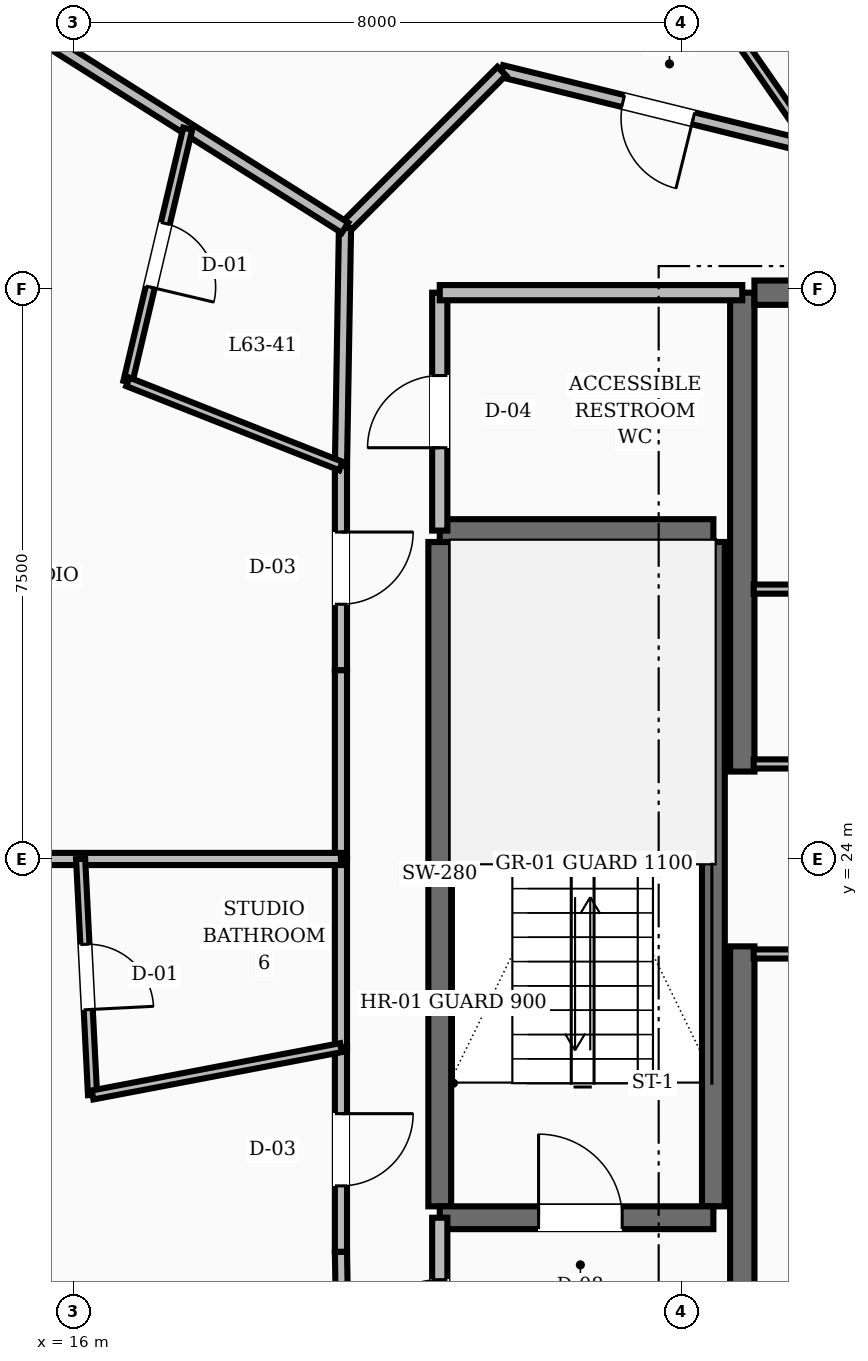
"""IFC4 building model, lengths in metres.
Left out: names, types, materials, properties, quantities, classifications, styles, units other than length and angle.
Written with IfcOpenShell. Run it as: python <this file> out.ifc"""

import sys

from ifc_helpers import new_model, si_unit, direction, frame, frame_2d, origin, place, context, subcontext, project, spatial, rectangle, extrude, element, fill, save


model = new_model("IFC4")
c1 = context("Model", 3, precision=1e-05, world=origin(), true_north=direction((0.0, 1.0)))
c2 = subcontext(c1, "Body", "Model", "MODEL_VIEW")
j1 = project(units=[si_unit("LENGTHUNIT", "METRE"), si_unit("PLANEANGLEUNIT", "RADIAN")], contexts=[c1])
p1 = place(None, origin())
s1 = spatial("IfcSite", under=j1, at=p1, CompositionType="ELEMENT")
p2 = place(p1, origin())
s2 = spatial("IfcBuilding", under=s1, at=p2, CompositionType="ELEMENT")
p3 = place(p2, frame((0.0, 0.0, 243.6)))
s3 = spatial("IfcBuildingStorey", under=s2, at=p3, CompositionType="ELEMENT", Elevation=243.6)
for number, where, z_axis, x_axis in (
    (1, (24.8, 16.55, 0.0), (0.0, 0.0, 1.0), (0.0, 1.0, 0.0)),
    (2, (24.8, 25.15, 0.0), (0.0, 0.0, 1.0), (0.0, 1.0, 0.0)),
):
    element("IfcWall", number, at=place(p3, frame(where, z_axis=z_axis, x_axis=x_axis)), inside=s3, PredefinedType="SHEAR", context=c2, shape_type="SweptSolid", body=[
        extrude(rectangle(XDim=6.3, YDim=0.32, at=frame_2d((3.15, 0.0))), origin(), (0.0, 0.0, 1.0), 3.6),
    ])
p4 = place(p3, frame((24.96, 31.45, 0.0), z_axis=(0.0, 0.0, 1.0), x_axis=(1.0, 0.0, 0.0)))
e3 = element("IfcWall", 3, at=p4, inside=s3, PredefinedType="SHEAR", context=c2, shape_type="SweptSolid", body=[
    extrude(rectangle(XDim=3.24, YDim=0.32, at=frame_2d((1.62, 0.0))), origin(), (0.0, 0.0, 1.0), 3.6),
])
for number, where, z_axis, x_axis in (
    (4, (20.82, 19.43, 0.0), (0.0, 0.0, 1.0), (0.0, 1.0, 0.0)),
    (5, (24.42, 19.43, 0.0), (0.0, 0.0, 1.0), (0.0, 1.0, 0.0)),
):
    element("IfcWall", number, at=place(p3, frame(where, z_axis=z_axis, x_axis=x_axis)), inside=s3, PredefinedType="SHEAR", context=c2, shape_type="SweptSolid", body=[
        extrude(rectangle(XDim=8.74, YDim=0.3, at=frame_2d((4.37, 0.0))), origin(), (0.0, 0.0, 1.0), 3.6),
    ])
p5 = place(p3, frame((20.82, 19.28, 0.0), z_axis=(0.0, 0.0, 1.0), x_axis=(1.0, 0.0, 0.0)))
e6 = element("IfcWall", 6, at=p5, inside=s3, PredefinedType="SHEAR", context=c2, shape_type="SweptSolid", body=[
    extrude(rectangle(XDim=3.6, YDim=0.3, at=frame_2d((1.8, 0.0))), origin(), (0.0, 0.0, 1.0), 3.6),
])
p6 = place(p5, frame((1.3, 0.0, 0.0)))
e7 = element("IfcOpeningElement", 7, at=p6, cuts=e6, PredefinedType="OPENING", context=c2, shape_type="SweptSolid", body=[
    extrude(rectangle(XDim=1.1, YDim=2.1, at=frame_2d((0.55, 1.05))), frame((0.0, 0.16, 0.0), z_axis=(0.0, -1.0, 0.0), x_axis=(1.0, 0.0, 0.0)), (0.0, 0.0, 1.0), 0.32),
])
p7 = place(p3, frame((20.82, 28.32, 0.0), z_axis=(0.0, 0.0, 1.0), x_axis=(1.0, 0.0, 0.0)))
e8 = element("IfcWall", 8, at=p7, inside=s3, PredefinedType="SHEAR", context=c2, shape_type="SweptSolid", body=[
    extrude(rectangle(XDim=3.6, YDim=0.3, at=frame_2d((1.8, 0.0))), origin(), (0.0, 0.0, 1.0), 3.6),
])
p8 = place(p3, frame((20.82, 16.55, 0.0), z_axis=(0.0, 0.0, 1.0), x_axis=(0.0, 1.0, 0.0)))
e9 = element("IfcWall", 9, at=p8, inside=s3, PredefinedType="SOLIDWALL", context=c2, shape_type="SweptSolid", body=[
    extrude(rectangle(XDim=2.73, YDim=0.2, at=frame_2d((1.365, 0.0))), origin(), (0.0, 0.0, 1.0), 2.87),
])
p9 = place(p8, frame((0.815, 0.0, 0.0)))
e10 = element("IfcOpeningElement", 10, at=p9, cuts=e9, PredefinedType="OPENING", context=c2, shape_type="SweptSolid", body=[
    extrude(rectangle(XDim=1.1, YDim=2.1, at=frame_2d((0.55, 1.05))), frame((0.0, 0.11, 0.0), z_axis=(0.0, -1.0, 0.0), x_axis=(1.0, 0.0, 0.0)), (0.0, 0.0, 1.0), 0.22),
])
p10 = place(p3, frame((20.82, 28.32, 0.0), z_axis=(0.0, 0.0, 1.0), x_axis=(0.0, 1.0, 0.0)))
e11 = element("IfcWall", 11, at=p10, inside=s3, PredefinedType="SOLIDWALL", context=c2, shape_type="SweptSolid", body=[
    extrude(rectangle(XDim=3.13, YDim=0.2, at=frame_2d((1.565, 0.0))), origin(), (0.0, 0.0, 1.0), 2.87),
])
p11 = place(p10, frame((1.09, 0.0, 0.0)))
e12 = element("IfcOpeningElement", 12, at=p11, cuts=e11, PredefinedType="OPENING", context=c2, shape_type="SweptSolid", body=[
    extrude(rectangle(XDim=0.95, YDim=2.1, at=frame_2d((0.475, 1.05))), frame((0.0, 0.11, 0.0), z_axis=(0.0, -1.0, 0.0), x_axis=(1.0, 0.0, 0.0)), (0.0, 0.0, 1.0), 0.22),
])
p12 = place(p3, frame((20.82, 31.45, 0.0), z_axis=(0.0, 0.0, 1.0), x_axis=(1.0, 0.0, 0.0)))
e13 = element("IfcWall", 13, at=p12, inside=s3, PredefinedType="SOLIDWALL", context=c2, shape_type="SweptSolid", body=[
    extrude(rectangle(XDim=3.98, YDim=0.2, at=frame_2d((1.99, 0.0))), origin(), (0.0, 0.0, 1.0), 2.87),
])
p13 = place(p3, frame((24.95, 25.25, 0.0), z_axis=(0.0, 0.0, 1.0), x_axis=(1.0, 0.0, 0.0)))
e14 = element("IfcWall", 14, at=p13, inside=s3, PredefinedType="PARTITIONING", context=c2, shape_type="SweptSolid", body=[
    extrude(rectangle(XDim=3.2, YDim=0.12, at=frame_2d((1.6, 0.0))), origin(), (0.0, 0.0, 1.0), 2.87),
])
p14 = place(p13, frame((1.125, 0.0, 0.0)))
e15 = element("IfcOpeningElement", 15, at=p14, cuts=e14, PredefinedType="OPENING", context=c2, shape_type="SweptSolid", body=[
    extrude(rectangle(XDim=0.95, YDim=2.1, at=frame_2d((0.475, 1.05))), frame((0.0, 0.07, 0.0), z_axis=(0.0, -1.0, 0.0), x_axis=(1.0, 0.0, 0.0)), (0.0, 0.0, 1.0), 0.14),
])
p15 = place(p3, frame((24.95, 22.75, 0.0), z_axis=(0.0, 0.0, 1.0), x_axis=(1.0, 0.0, 0.0)))
e16 = element("IfcWall", 16, at=p15, inside=s3, PredefinedType="PARTITIONING", context=c2, shape_type="SweptSolid", body=[
    extrude(rectangle(XDim=3.2, YDim=0.12, at=frame_2d((1.6, 0.0))), origin(), (0.0, 0.0, 1.0), 2.87),
])
p16 = place(p15, frame((1.125, 0.0, 0.0)))
e17 = element("IfcOpeningElement", 17, at=p16, cuts=e16, PredefinedType="OPENING", context=c2, shape_type="SweptSolid", body=[
    extrude(rectangle(XDim=0.95, YDim=2.1, at=frame_2d((0.475, 1.05))), frame((0.0, 0.07, 0.0), z_axis=(0.0, -1.0, 0.0), x_axis=(1.0, 0.0, 0.0)), (0.0, 0.0, 1.0), 0.14),
])
p17 = place(p3, frame((24.95, 27.55, 0.0), z_axis=(0.0, 0.0, 1.0), x_axis=(1.0, 0.0, 0.0)))
e18 = element("IfcWall", 18, at=p17, inside=s3, PredefinedType="PARTITIONING", context=c2, shape_type="SweptSolid", body=[
    extrude(rectangle(XDim=3.2, YDim=0.12, at=frame_2d((1.6, 0.0))), origin(), (0.0, 0.0, 1.0), 2.87),
])
p18 = place(p17, frame((1.125, 0.0, 0.0)))
e19 = element("IfcOpeningElement", 19, at=p18, cuts=e18, PredefinedType="OPENING", context=c2, shape_type="SweptSolid", body=[
    extrude(rectangle(XDim=0.95, YDim=2.1, at=frame_2d((0.475, 1.05))), frame((0.0, 0.07, 0.0), z_axis=(0.0, -1.0, 0.0), x_axis=(1.0, 0.0, 0.0)), (0.0, 0.0, 1.0), 0.14),
])
p19 = place(p3, frame((25.752, 33.35, 0.0), z_axis=(0.0, 0.0, 1.0), x_axis=(-0.970939799552, 0.239323850978, 0.0)))
e20 = element("IfcWall", 20, at=p19, inside=s3, PredefinedType="SOLIDWALL", context=c2, shape_type="SweptSolid", body=[
    extrude(rectangle(XDim=4.241, YDim=0.16, at=frame_2d((2.12, 0.0))), origin(), (0.0, 0.0, 1.0), 2.87),
])
p20 = place(p19, frame((1.646, 0.0, 0.0)))
e21 = element("IfcOpeningElement", 21, at=p20, cuts=e20, PredefinedType="OPENING", context=c2, shape_type="SweptSolid", body=[
    extrude(rectangle(XDim=0.95, YDim=2.1, at=frame_2d((0.475, 1.05))), frame((0.0, 0.09, 0.0), z_axis=(0.0, -1.0, 0.0), x_axis=(1.0, 0.0, 0.0)), (0.0, 0.0, 1.0), 0.18),
])
p21 = place(p3, frame((21.635, 34.365, 0.0), z_axis=(0.0, 0.0, 1.0), x_axis=(-0.707106781187, -0.707106781187, 0.0)))
e22 = element("IfcWall", 22, at=p21, inside=s3, PredefinedType="SOLIDWALL", context=c2, shape_type="SweptSolid", body=[
    extrude(rectangle(XDim=2.916, YDim=0.16, at=frame_2d((1.458, 0.0))), origin(), (0.0, 0.0, 1.0), 2.87),
])
p22 = place(p3, frame((19.573, 32.303, 0.0), z_axis=(0.0, 0.0, 1.0), x_axis=(-0.016981035134, -0.999855811828, 0.0)))
e23 = element("IfcWall", 23, at=p22, inside=s3, PredefinedType="SOLIDWALL", context=c2, shape_type="SweptSolid", body=[
    extrude(rectangle(XDim=3.134, YDim=0.16, at=frame_2d((1.567, 0.0))), origin(), (0.0, 0.0, 1.0), 2.87),
])
p23 = place(p3, frame((19.52, 29.169, 0.0), z_axis=(0.0, 0.0, 1.0), x_axis=(0.0, -1.0, 0.0)))
e24 = element("IfcWall", 24, at=p23, inside=s3, PredefinedType="SOLIDWALL", context=c2, shape_type="SweptSolid", body=[
    extrude(rectangle(XDim=2.687, YDim=0.16, at=frame_2d((1.344, 0.0))), origin(), (0.0, 0.0, 1.0), 2.87),
])
p24 = place(p23, frame((0.868, 0.0, 0.0)))
e25 = element("IfcOpeningElement", 25, at=p24, cuts=e24, PredefinedType="OPENING", context=c2, shape_type="SweptSolid", body=[
    extrude(rectangle(XDim=0.95, YDim=2.1, at=frame_2d((0.475, 1.05))), frame((0.0, 0.09, 0.0), z_axis=(0.0, -1.0, 0.0), x_axis=(1.0, 0.0, 0.0)), (0.0, 0.0, 1.0), 0.18),
])
for number, where, z_axis, x_axis in (
    (26, (19.52, 26.482, 0.0), (0.0, 0.0, 1.0), (0.0, -1.0, 0.0)),
    (27, (19.52, 24.0, 0.0), (0.0, 0.0, 1.0), (0.0, -1.0, 0.0)),
):
    element("IfcWall", number, at=place(p3, frame(where, z_axis=z_axis, x_axis=x_axis)), inside=s3, PredefinedType="SOLIDWALL", context=c2, shape_type="SweptSolid", body=[
        extrude(rectangle(XDim=2.482, YDim=0.16, at=frame_2d((1.241, 0.0))), origin(), (0.0, 0.0, 1.0), 2.87),
    ])
p25 = place(p3, frame((19.52, 21.518, 0.0), z_axis=(0.0, 0.0, 1.0), x_axis=(0.0, -1.0, 0.0)))
e28 = element("IfcWall", 28, at=p25, inside=s3, PredefinedType="SOLIDWALL", context=c2, shape_type="SweptSolid", body=[
    extrude(rectangle(XDim=2.687, YDim=0.16, at=frame_2d((1.344, 0.0))), origin(), (0.0, 0.0, 1.0), 2.87),
])
p26 = place(p25, frame((0.868, 0.0, 0.0)))
e29 = element("IfcOpeningElement", 29, at=p26, cuts=e28, PredefinedType="OPENING", context=c2, shape_type="SweptSolid", body=[
    extrude(rectangle(XDim=0.95, YDim=2.1, at=frame_2d((0.475, 1.05))), frame((0.0, 0.09, 0.0), z_axis=(0.0, -1.0, 0.0), x_axis=(1.0, 0.0, 0.0)), (0.0, 0.0, 1.0), 0.18),
])
p27 = place(p3, frame((19.52, 18.831, 0.0), z_axis=(0.0, 0.0, 1.0), x_axis=(0.016981035134, -0.999855811828, 0.0)))
e30 = element("IfcWall", 30, at=p27, inside=s3, PredefinedType="SOLIDWALL", context=c2, shape_type="SweptSolid", body=[
    extrude(rectangle(XDim=3.134, YDim=0.16, at=frame_2d((1.567, 0.0))), origin(), (0.0, 0.0, 1.0), 2.87),
])
p28 = place(p3, frame((28.127, 33.35, 0.0), z_axis=(0.0, 0.0, 1.0), x_axis=(-0.393632832197, 0.919267748492, 0.0)))
e31 = element("IfcWall", 31, at=p28, inside=s3, PredefinedType="SOLIDWALL", context=c2, shape_type="SweptSolid", body=[
    extrude(rectangle(XDim=11.007, YDim=0.16, at=frame_2d((5.503, 0.0))), origin(), (0.0, 0.0, 1.0), 2.87),
])
p29 = place(p3, frame((25.752, 33.35, 0.0), z_axis=(0.0, 0.0, 1.0), x_axis=(-0.569728092648, 0.821833255866, 0.0)))
e32 = element("IfcWall", 32, at=p29, inside=s3, PredefinedType="PARTITIONING", context=c2, shape_type="SweptSolid", body=[
    extrude(rectangle(XDim=3.797, YDim=0.12, at=frame_2d((1.898, 0.0))), origin(), (0.0, 0.0, 1.0), 2.87),
])
p30 = place(p3, frame((19.573, 32.303, 0.0), z_axis=(0.0, 0.0, 1.0), x_axis=(-0.845977345185, 0.533218840096, 0.0)))
e33 = element("IfcWall", 33, at=p30, inside=s3, PredefinedType="SOLIDWALL", context=c2, shape_type="SweptSolid", body=[
    extrude(rectangle(XDim=6.385, YDim=0.16, at=frame_2d((3.193, 0.0))), origin(), (0.0, 0.0, 1.0), 2.87),
])
p31 = place(p3, frame((17.504, 33.607, 0.0), z_axis=(0.0, 0.0, 1.0), x_axis=(-0.230128636875, -0.973160218304, 0.0)))
e34 = element("IfcWall", 34, at=p31, inside=s3, PredefinedType="PARTITIONING", context=c2, shape_type="SweptSolid", body=[
    extrude(rectangle(XDim=3.422, YDim=0.12, at=frame_2d((1.711, 0.0))), origin(), (0.0, 0.0, 1.0), 2.87),
])
p32 = place(p31, frame((1.281, 0.0, 0.0)))
e35 = element("IfcOpeningElement", 35, at=p32, cuts=e34, PredefinedType="OPENING", context=c2, shape_type="SweptSolid", body=[
    extrude(rectangle(XDim=0.86, YDim=2.1, at=frame_2d((0.43, 1.05))), frame((0.0, 0.07, 0.0), z_axis=(0.0, -1.0, 0.0), x_axis=(1.0, 0.0, 0.0)), (0.0, 0.0, 1.0), 0.14),
])
p33 = place(p3, frame((19.52, 29.169, 0.0), z_axis=(0.0, 0.0, 1.0), x_axis=(-0.930082401802, 0.367350957339, 0.0)))
e36 = element("IfcWall", 36, at=p33, inside=s3, PredefinedType="PARTITIONING", context=c2, shape_type="SweptSolid", body=[
    extrude(rectangle(XDim=3.014, YDim=0.12, at=frame_2d((1.507, 0.0))), origin(), (0.0, 0.0, 1.0), 2.87),
])
p34 = place(p3, frame((19.52, 24.0, 0.0), z_axis=(0.0, 0.0, 1.0), x_axis=(-1.0, 0.0, 0.0)))
e37 = element("IfcWall", 37, at=p34, inside=s3, PredefinedType="SOLIDWALL", context=c2, shape_type="SweptSolid", body=[
    extrude(rectangle(XDim=8.963, YDim=0.16, at=frame_2d((4.481, 0.0))), origin(), (0.0, 0.0, 1.0), 2.87),
])
p35 = place(p3, frame((16.095, 24.0, 0.0), z_axis=(0.0, 0.0, 1.0), x_axis=(0.050493770541, -0.99872437596, 0.0)))
e38 = element("IfcWall", 38, at=p35, inside=s3, PredefinedType="PARTITIONING", context=c2, shape_type="SweptSolid", body=[
    extrude(rectangle(XDim=3.109, YDim=0.12, at=frame_2d((1.554, 0.0))), origin(), (0.0, 0.0, 1.0), 2.87),
])
p36 = place(p35, frame((1.125, 0.0, 0.0)))
e39 = element("IfcOpeningElement", 39, at=p36, cuts=e38, PredefinedType="OPENING", context=c2, shape_type="SweptSolid", body=[
    extrude(rectangle(XDim=0.86, YDim=2.1, at=frame_2d((0.43, 1.05))), frame((0.0, 0.07, 0.0), z_axis=(0.0, -1.0, 0.0), x_axis=(1.0, 0.0, 0.0)), (0.0, 0.0, 1.0), 0.14),
])
p37 = place(p3, frame((19.52, 21.518, 0.0), z_axis=(0.0, 0.0, 1.0), x_axis=(-0.982334712285, -0.187132340978, 0.0)))
e40 = element("IfcWall", 40, at=p37, inside=s3, PredefinedType="PARTITIONING", context=c2, shape_type="SweptSolid", body=[
    extrude(rectangle(XDim=3.327, YDim=0.12, at=frame_2d((1.664, 0.0))), origin(), (0.0, 0.0, 1.0), 2.87),
])
p38 = place(p6, origin())
e41 = element("IfcDoor", 41, at=p38, inside=s3, OperationType="SINGLE_SWING_LEFT", PredefinedType="DOOR", context=c2, shape_type="SweptSolid", body=[
    extrude(rectangle(XDim=1.1, YDim=2.1, at=frame_2d((0.55, 1.05))), frame((0.0, 0.025, 0.0), z_axis=(0.0, -1.0, 0.0), x_axis=(1.0, 0.0, 0.0)), (0.0, 0.0, 1.0), 0.05),
])
fill(e7, e41)
p39 = place(p9, origin())
e42 = element("IfcDoor", 42, at=p39, inside=s3, OperationType="SINGLE_SWING_LEFT", PredefinedType="DOOR", context=c2, shape_type="SweptSolid", body=[
    extrude(rectangle(XDim=1.1, YDim=2.1, at=frame_2d((0.55, 1.05))), frame((0.0, 0.025, 0.0), z_axis=(0.0, -1.0, 0.0), x_axis=(1.0, 0.0, 0.0)), (0.0, 0.0, 1.0), 0.05),
])
fill(e10, e42)
p40 = place(p11, origin())
e43 = element("IfcDoor", 43, at=p40, inside=s3, OperationType="SINGLE_SWING_LEFT", PredefinedType="DOOR", context=c2, shape_type="SweptSolid", body=[
    extrude(rectangle(XDim=0.95, YDim=2.1, at=frame_2d((0.475, 1.05))), frame((0.0, 0.025, 0.0), z_axis=(0.0, -1.0, 0.0), x_axis=(1.0, 0.0, 0.0)), (0.0, 0.0, 1.0), 0.05),
])
fill(e12, e43)
p41 = place(p20, origin())
e44 = element("IfcDoor", 44, at=p41, inside=s3, OperationType="SINGLE_SWING_LEFT", PredefinedType="DOOR", context=c2, shape_type="SweptSolid", body=[
    extrude(rectangle(XDim=0.95, YDim=2.1, at=frame_2d((0.475, 1.05))), frame((0.0, 0.025, 0.0), z_axis=(0.0, -1.0, 0.0), x_axis=(1.0, 0.0, 0.0)), (0.0, 0.0, 1.0), 0.05),
])
fill(e21, e44)
p42 = place(p32, origin())
e45 = element("IfcDoor", 45, at=p42, inside=s3, OperationType="SINGLE_SWING_RIGHT", PredefinedType="DOOR", context=c2, shape_type="SweptSolid", body=[
    extrude(rectangle(XDim=0.86, YDim=2.1, at=frame_2d((0.43, 1.05))), frame((0.0, 0.025, 0.0), z_axis=(0.0, -1.0, 0.0), x_axis=(1.0, 0.0, 0.0)), (0.0, 0.0, 1.0), 0.05),
])
fill(e35, e45)
p43 = place(p24, origin())
e46 = element("IfcDoor", 46, at=p43, inside=s3, OperationType="SINGLE_SWING_LEFT", PredefinedType="DOOR", context=c2, shape_type="SweptSolid", body=[
    extrude(rectangle(XDim=0.95, YDim=2.1, at=frame_2d((0.475, 1.05))), frame((0.0, 0.025, 0.0), z_axis=(0.0, -1.0, 0.0), x_axis=(1.0, 0.0, 0.0)), (0.0, 0.0, 1.0), 0.05),
])
fill(e25, e46)
p44 = place(p36, origin())
e47 = element("IfcDoor", 47, at=p44, inside=s3, OperationType="SINGLE_SWING_RIGHT", PredefinedType="DOOR", context=c2, shape_type="SweptSolid", body=[
    extrude(rectangle(XDim=0.86, YDim=2.1, at=frame_2d((0.43, 1.05))), frame((0.0, 0.025, 0.0), z_axis=(0.0, -1.0, 0.0), x_axis=(1.0, 0.0, 0.0)), (0.0, 0.0, 1.0), 0.05),
])
fill(e39, e47)
p45 = place(p26, origin())
e48 = element("IfcDoor", 48, at=p45, inside=s3, OperationType="SINGLE_SWING_LEFT", PredefinedType="DOOR", context=c2, shape_type="SweptSolid", body=[
    extrude(rectangle(XDim=0.95, YDim=2.1, at=frame_2d((0.475, 1.05))), frame((0.0, 0.025, 0.0), z_axis=(0.0, -1.0, 0.0), x_axis=(1.0, 0.0, 0.0)), (0.0, 0.0, 1.0), 0.05),
])
fill(e29, e48)
save(model, sys.argv[1])
